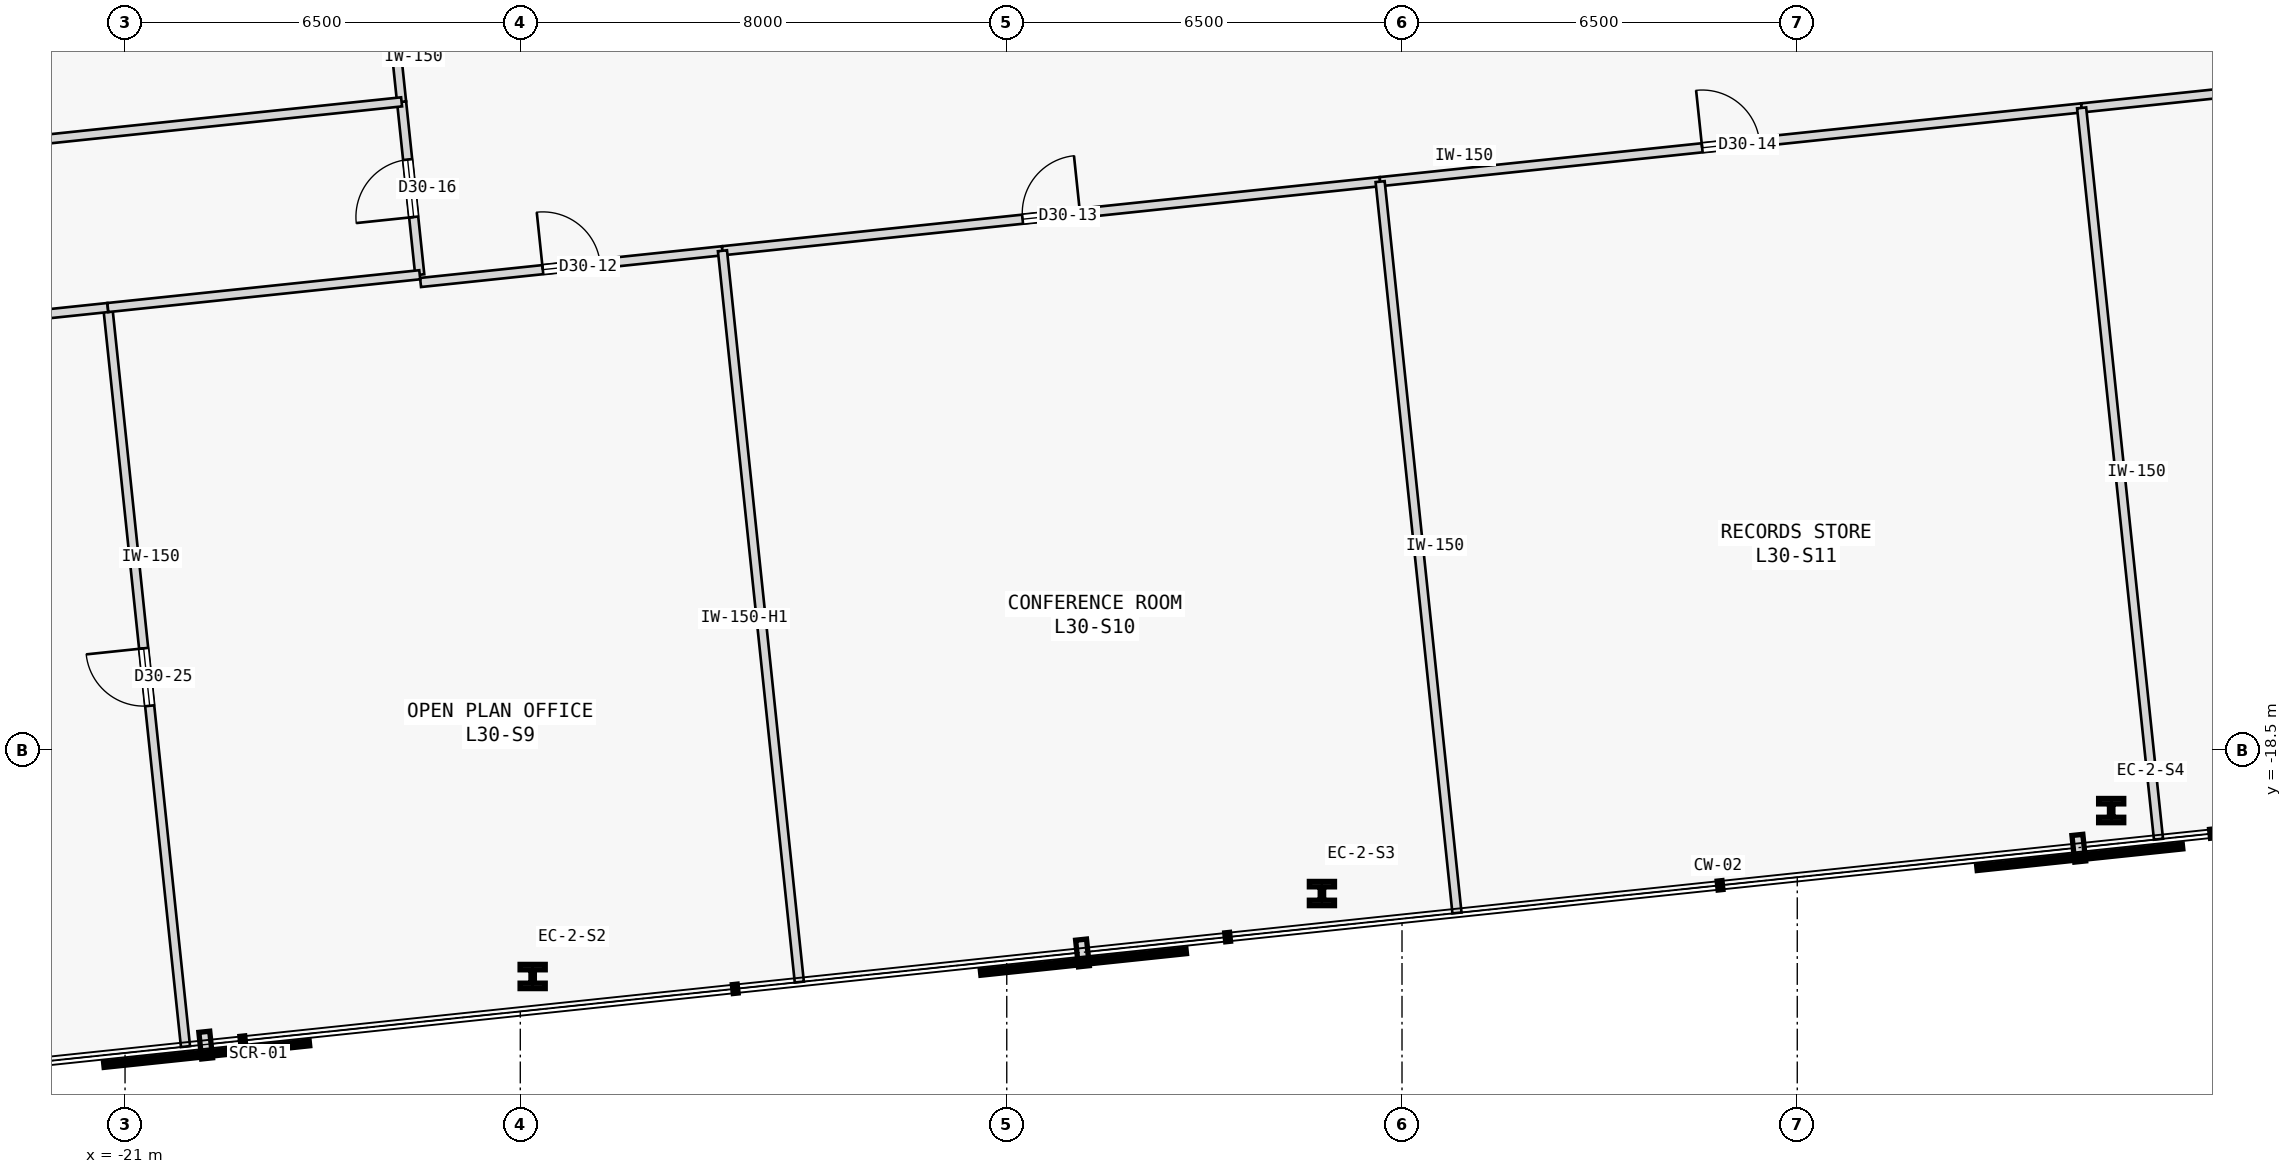
"""IFC4 building model, lengths in metres.
Left out: names, types, materials, properties, quantities, classifications, styles, units other than length and angle.
Written with IfcOpenShell. Run it as: python <this file> out.ifc"""

import sys

from ifc_helpers import new_model, si_unit, direction, frame, frame_2d, origin, origin_2d, place, context, subcontext, project, spatial, rectangle, i_section, extrude, element, fill, save


model = new_model("IFC4")
c1 = context("Model", 3, precision=1e-05, world=origin(), true_north=direction((0.0, 1.0)))
c2 = subcontext(c1, "Body", "Model", "MODEL_VIEW")
j1 = project(units=[si_unit("LENGTHUNIT", "METRE"), si_unit("PLANEANGLEUNIT", "RADIAN")], contexts=[c1])
p1 = place(None, origin())
s1 = spatial("IfcSite", under=j1, at=p1, CompositionType="ELEMENT")
p2 = place(p1, origin())
s2 = spatial("IfcBuilding", under=s1, at=p2, CompositionType="ELEMENT")
p3 = place(p2, frame((0.0, 0.0, 120.7)))
s3 = spatial("IfcBuildingStorey", under=s2, at=p3, CompositionType="ELEMENT", Elevation=120.7)
for number, where, z_axis, x_axis in (
    (1, (-14.297, -22.222, 0.0), (0.0, 0.0, 1.0), (1.0, 0.0, 0.0)),
    (2, (-1.317, -20.858, 0.0), (0.0, 0.0, 1.0), (1.0, 0.0, 0.0)),
    (3, (11.663, -19.494, 0.0), (0.0, 0.0, 1.0), (1.0, 0.0, 0.0)),
):
    element("IfcColumn", number, at=place(p3, frame(where, z_axis=z_axis, x_axis=x_axis)), inside=s3, PredefinedType="COLUMN", context=c2, shape_type="SweptSolid", body=[
        extrude(i_section(OverallWidth=0.413, OverallDepth=0.398, WebThickness=0.056, FlangeThickness=0.089, FilletRadius=0.015, at=origin_2d()), origin(), (0.0, 0.0, 1.0), 3.7),
    ])
p4 = place(p3, frame((-16.14, -10.809, 0.0), z_axis=(0.0, 0.0, 1.0), x_axis=(0.994523393184, 0.104514211519, 0.0)))
e4 = element("IfcWall", 4, at=p4, inside=s3, PredefinedType="PARTITIONING", context=c2, shape_type="SweptSolid", body=[
    extrude(rectangle(XDim=4.992, YDim=0.15, at=frame_2d((2.496, 0.0))), origin(), (0.0, 0.0, 1.0), 3.475),
])
p5 = place(p4, frame((2.021, 0.0, 0.0)))
e5 = element("IfcOpeningElement", 5, at=p5, cuts=e4, PredefinedType="OPENING", context=c2, shape_type="SweptSolid", body=[
    extrude(rectangle(XDim=0.95, YDim=2.15, at=frame_2d((0.475, 1.075))), frame((0.0, 0.085, 0.0), z_axis=(0.0, -1.0, 0.0), x_axis=(1.0, 0.0, 0.0)), (0.0, 0.0, 1.0), 0.17),
])
p6 = place(p3, frame((-11.175, -10.287, 0.0), z_axis=(0.0, 0.0, 1.0), x_axis=(0.994522169869, 0.104525851533, 0.0)))
e6 = element("IfcWall", 6, at=p6, inside=s3, PredefinedType="PARTITIONING", context=c2, shape_type="SweptSolid", body=[
    extrude(rectangle(XDim=10.875, YDim=0.15, at=frame_2d((5.438, 0.0))), origin(), (0.0, 0.0, 1.0), 3.475),
])
p7 = place(p6, frame((4.962, 0.0, 0.0)))
e7 = element("IfcOpeningElement", 7, at=p7, cuts=e6, PredefinedType="OPENING", context=c2, shape_type="SweptSolid", body=[
    extrude(rectangle(XDim=0.95, YDim=2.15, at=frame_2d((0.475, 1.075))), frame((0.0, 0.085, 0.0), z_axis=(0.0, -1.0, 0.0), x_axis=(1.0, 0.0, 0.0)), (0.0, 0.0, 1.0), 0.17),
])
p8 = place(p3, frame((-0.36, -9.151, 0.0), z_axis=(0.0, 0.0, 1.0), x_axis=(0.994520780406, 0.10453907088, 0.0)))
e8 = element("IfcWall", 8, at=p8, inside=s3, PredefinedType="PARTITIONING", context=c2, shape_type="SweptSolid", body=[
    extrude(rectangle(XDim=11.6, YDim=0.15, at=frame_2d((5.8, 0.0))), origin(), (0.0, 0.0, 1.0), 3.475),
])
p9 = place(p8, frame((5.325, 0.0, 0.0)))
e9 = element("IfcOpeningElement", 9, at=p9, cuts=e8, PredefinedType="OPENING", context=c2, shape_type="SweptSolid", body=[
    extrude(rectangle(XDim=0.95, YDim=2.15, at=frame_2d((0.475, 1.075))), frame((0.0, 0.085, 0.0), z_axis=(0.0, -1.0, 0.0), x_axis=(1.0, 0.0, 0.0)), (0.0, 0.0, 1.0), 0.17),
])
p10 = place(p3, frame((11.177, -7.938, 0.0), z_axis=(0.0, 0.0, 1.0), x_axis=(0.994525011473, 0.104498811264, 0.0)))
e10 = element("IfcWall", 10, at=p10, inside=s3, PredefinedType="PARTITIONING", context=c2, shape_type="SweptSolid", body=[
    extrude(rectangle(XDim=7.107, YDim=0.15, at=frame_2d((3.553, 0.0))), origin(), (0.0, 0.0, 1.0), 3.475),
])
p11 = place(p10, frame((3.079, 0.0, 0.0)))
e11 = element("IfcOpeningElement", 11, at=p11, cuts=e10, PredefinedType="OPENING", context=c2, shape_type="SweptSolid", body=[
    extrude(rectangle(XDim=0.95, YDim=2.15, at=frame_2d((0.475, 1.075))), frame((0.0, 0.085, 0.0), z_axis=(0.0, -1.0, 0.0), x_axis=(1.0, 0.0, 0.0)), (0.0, 0.0, 1.0), 0.17),
])
p12 = place(p3, frame((-16.153, -10.682, 0.0), z_axis=(0.0, 0.0, 1.0), x_axis=(-0.104600331874, 0.994514339048, 0.0)))
e12 = element("IfcWall", 12, at=p12, inside=s3, PredefinedType="PARTITIONING", context=c2, shape_type="SweptSolid", body=[
    extrude(rectangle(XDim=2.859, YDim=0.15, at=frame_2d((1.43, 0.0))), origin(), (0.0, 0.0, 1.0), 3.475),
])
p13 = place(p12, frame((0.955, 0.0, 0.0)))
e13 = element("IfcOpeningElement", 13, at=p13, cuts=e12, PredefinedType="OPENING", context=c2, shape_type="SweptSolid", body=[
    extrude(rectangle(XDim=0.95, YDim=2.15, at=frame_2d((0.475, 1.075))), frame((0.0, 0.085, 0.0), z_axis=(0.0, -1.0, 0.0), x_axis=(1.0, 0.0, 0.0)), (0.0, 0.0, 1.0), 0.17),
])
p14 = place(p3, frame((-16.452, -7.838, 0.0), z_axis=(0.0, 0.0, 1.0), x_axis=(-0.104481590513, 0.994526820777, 0.0)))
e14 = element("IfcWall", 14, at=p14, inside=s3, PredefinedType="PARTITIONING", context=c2, shape_type="SweptSolid", body=[
    extrude(rectangle(XDim=3.753, YDim=0.15, at=frame_2d((1.876, 0.0))), origin(), (0.0, 0.0, 1.0), 3.475),
])
p15 = place(p14, frame((1.402, 0.0, 0.0)))
e15 = element("IfcOpeningElement", 15, at=p15, cuts=e14, PredefinedType="OPENING", context=c2, shape_type="SweptSolid", body=[
    extrude(rectangle(XDim=0.95, YDim=2.15, at=frame_2d((0.475, 1.075))), frame((0.0, 0.085, 0.0), z_axis=(0.0, -1.0, 0.0), x_axis=(1.0, 0.0, 0.0)), (0.0, 0.0, 1.0), 0.17),
])
p16 = place(p3, frame((-20.006, -23.375, 0.0), z_axis=(0.0, 0.0, 1.0), x_axis=(-0.104540236679, 0.994520657862, 0.0)))
e16 = element("IfcWall", 16, at=p16, inside=s3, PredefinedType="PARTITIONING", context=c2, shape_type="SweptSolid", body=[
    extrude(rectangle(XDim=12.221, YDim=0.15, at=frame_2d((6.11, 0.0))), origin(), (0.0, 0.0, 1.0), 3.475),
])
p17 = place(p16, frame((5.635, 0.0, 0.0)))
e17 = element("IfcOpeningElement", 17, at=p17, cuts=e16, PredefinedType="OPENING", context=c2, shape_type="SweptSolid", body=[
    extrude(rectangle(XDim=0.95, YDim=2.15, at=frame_2d((0.475, 1.075))), frame((0.0, 0.085, 0.0), z_axis=(0.0, -1.0, 0.0), x_axis=(1.0, 0.0, 0.0)), (0.0, 0.0, 1.0), 0.17),
])
p18 = place(p3, frame((-32.099, -12.358, 0.0), z_axis=(0.0, 0.0, 1.0), x_axis=(0.994522169869, 0.104525851533, 0.0)))
e18 = element("IfcWall", 18, at=p18, inside=s3, PredefinedType="PARTITIONING", context=c2, shape_type="SweptSolid", body=[
    extrude(rectangle(XDim=10.875, YDim=0.15, at=frame_2d((5.438, 0.0))), origin(), (0.0, 0.0, 1.0), 3.475),
])
p19 = place(p3, frame((-9.911, -22.314, 0.0), z_axis=(0.0, 0.0, 1.0), x_axis=(-0.104515587229, 0.99452324861, 0.0)))
e19 = element("IfcWall", 19, at=p19, inside=s3, PredefinedType="PARTITIONING", context=c2, shape_type="SweptSolid", body=[
    extrude(rectangle(XDim=12.093, YDim=0.15, at=frame_2d((6.046, 0.0))), origin(), (0.0, 0.0, 1.0), 3.025),
])
p20 = place(p3, frame((-21.283, -11.221, 0.0), z_axis=(0.0, 0.0, 1.0), x_axis=(0.994524110249, 0.104507387942, 0.0)))
e20 = element("IfcWall", 20, at=p20, inside=s3, PredefinedType="PARTITIONING", context=c2, shape_type="SweptSolid", body=[
    extrude(rectangle(XDim=5.158, YDim=0.15, at=frame_2d((2.579, 0.0))), origin(), (0.0, 0.0, 1.0), 3.475),
])
p21 = place(p3, frame((0.904, -21.177, 0.0), z_axis=(0.0, 0.0, 1.0), x_axis=(-0.104517685722, 0.994523028075, 0.0)))
e21 = element("IfcWall", 21, at=p21, inside=s3, PredefinedType="PARTITIONING", context=c2, shape_type="SweptSolid", body=[
    extrude(rectangle(XDim=12.093, YDim=0.15, at=frame_2d((6.046, 0.0))), origin(), (0.0, 0.0, 1.0), 3.475),
])
p22 = place(p3, frame((12.441, -19.965, 0.0), z_axis=(0.0, 0.0, 1.0), x_axis=(-0.104535555083, 0.994521149963, 0.0)))
e22 = element("IfcWall", 22, at=p22, inside=s3, PredefinedType="PARTITIONING", context=c2, shape_type="SweptSolid", body=[
    extrude(rectangle(XDim=12.093, YDim=0.15, at=frame_2d((6.046, 0.0))), origin(), (0.0, 0.0, 1.0), 3.475),
])
p23 = place(p3, frame((-32.397, -9.514, 0.0), z_axis=(0.0, 0.0, 1.0), x_axis=(0.994521044813, 0.104536555445, 0.0)))
e23 = element("IfcWall", 23, at=p23, inside=s3, PredefinedType="PARTITIONING", context=c2, shape_type="SweptSolid", body=[
    extrude(rectangle(XDim=16.033, YDim=0.15, at=frame_2d((8.017, 0.0))), origin(), (0.0, 0.0, 1.0), 3.475),
])
p24 = place(p5, origin())
e24 = element("IfcDoor", 24, at=p24, inside=s3, OperationType="SINGLE_SWING_LEFT", PredefinedType="DOOR", context=c2, shape_type="SweptSolid", body=[
    extrude(rectangle(XDim=0.95, YDim=2.15, at=frame_2d((0.475, 1.075))), frame((0.0, 0.025, 0.0), z_axis=(0.0, -1.0, 0.0), x_axis=(1.0, 0.0, 0.0)), (0.0, 0.0, 1.0), 0.05),
])
fill(e5, e24)
p25 = place(p7, origin())
e25 = element("IfcDoor", 25, at=p25, inside=s3, OperationType="SINGLE_SWING_RIGHT", PredefinedType="DOOR", context=c2, shape_type="SweptSolid", body=[
    extrude(rectangle(XDim=0.95, YDim=2.15, at=frame_2d((0.475, 1.075))), frame((0.0, 0.025, 0.0), z_axis=(0.0, -1.0, 0.0), x_axis=(1.0, 0.0, 0.0)), (0.0, 0.0, 1.0), 0.05),
])
fill(e7, e25)
p26 = place(p9, origin())
e26 = element("IfcDoor", 26, at=p26, inside=s3, OperationType="SINGLE_SWING_LEFT", PredefinedType="DOOR", context=c2, shape_type="SweptSolid", body=[
    extrude(rectangle(XDim=0.95, YDim=2.15, at=frame_2d((0.475, 1.075))), frame((0.0, 0.025, 0.0), z_axis=(0.0, -1.0, 0.0), x_axis=(1.0, 0.0, 0.0)), (0.0, 0.0, 1.0), 0.05),
])
fill(e9, e26)
p27 = place(p13, origin())
e27 = element("IfcDoor", 27, at=p27, inside=s3, OperationType="SINGLE_SWING_LEFT", PredefinedType="DOOR", context=c2, shape_type="SweptSolid", body=[
    extrude(rectangle(XDim=0.95, YDim=2.15, at=frame_2d((0.475, 1.075))), frame((0.0, 0.025, 0.0), z_axis=(0.0, -1.0, 0.0), x_axis=(1.0, 0.0, 0.0)), (0.0, 0.0, 1.0), 0.05),
])
fill(e13, e27)
p28 = place(p17, origin())
e28 = element("IfcDoor", 28, at=p28, inside=s3, OperationType="SINGLE_SWING_RIGHT", PredefinedType="DOOR", context=c2, shape_type="SweptSolid", body=[
    extrude(rectangle(XDim=0.95, YDim=2.15, at=frame_2d((0.475, 1.075))), frame((0.0, 0.025, 0.0), z_axis=(0.0, -1.0, 0.0), x_axis=(1.0, 0.0, 0.0)), (0.0, 0.0, 1.0), 0.05),
])
fill(e17, e28)
save(model, sys.argv[1])
